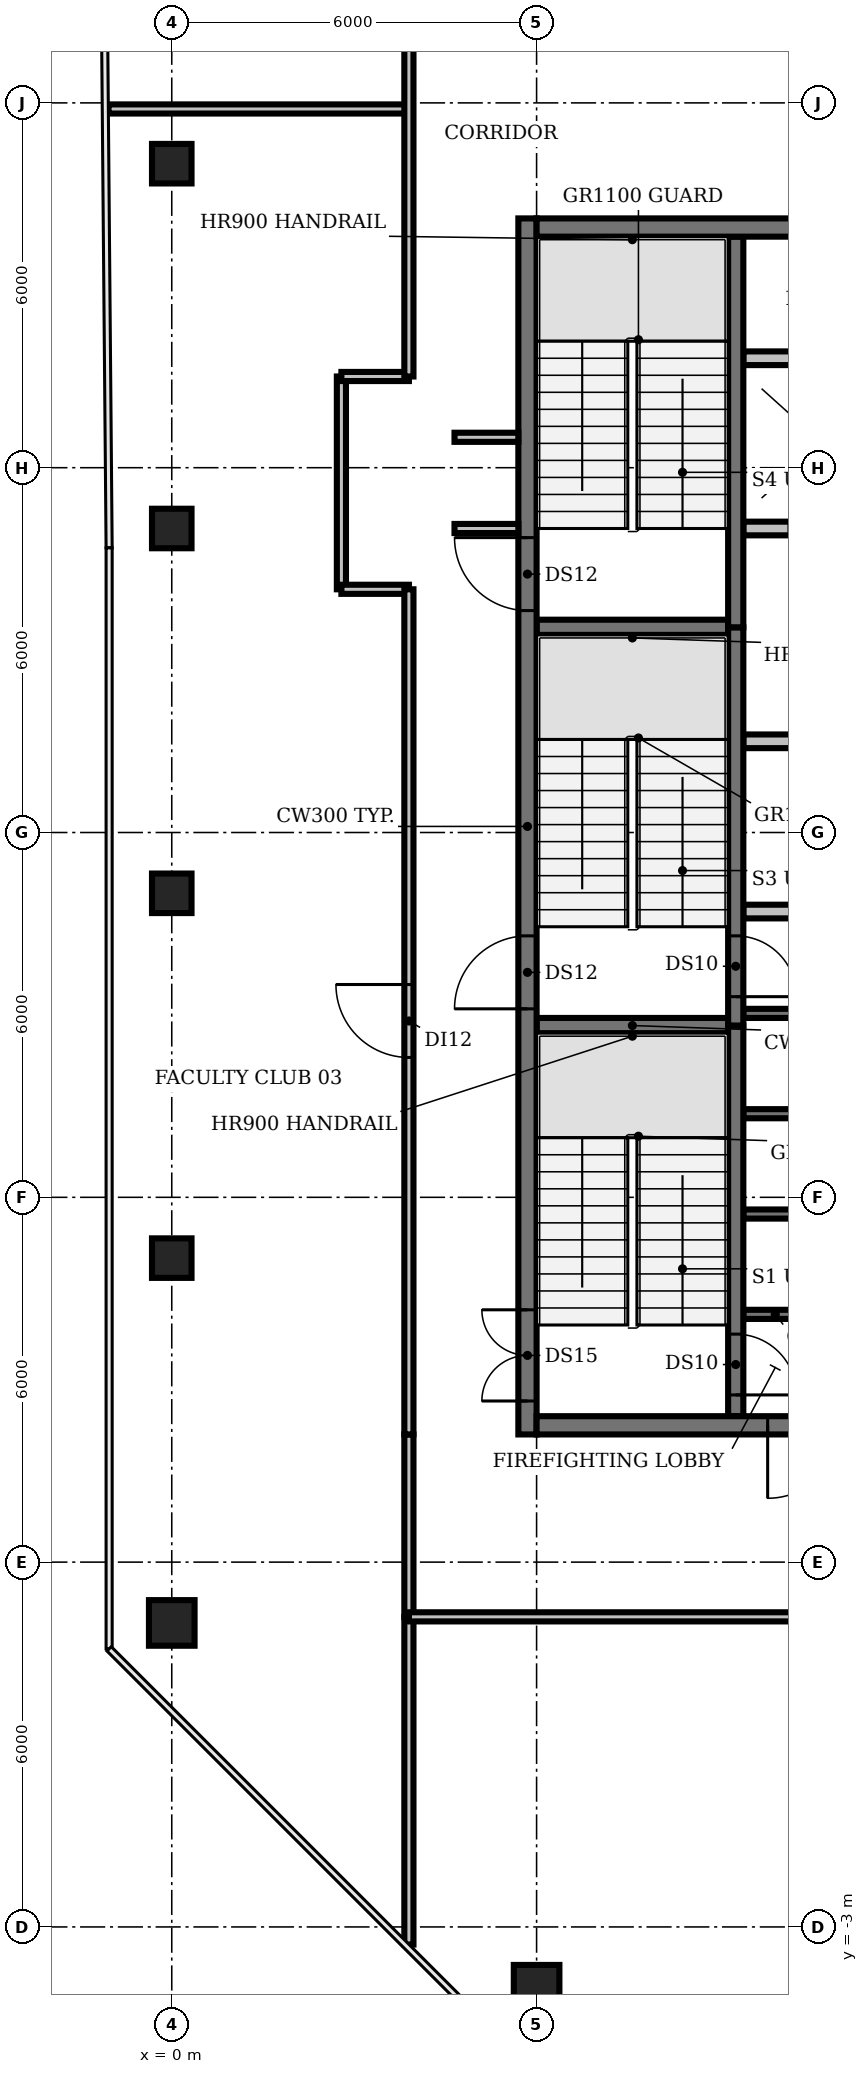
"""IFC4 building model, lengths in metres.
Left out: names, types, materials, properties, quantities, classifications, styles, units other than length and angle.
Written with IfcOpenShell. Run it as: python <this file> out.ifc"""

import sys

from ifc_helpers import new_model, si_unit, direction, frame, frame_2d, origin, origin_2d, place, context, subcontext, project, spatial, rectangle, circle, extrude, element, fill, save


model = new_model("IFC4")
c1 = context("Model", 3, precision=1e-05, world=origin(), true_north=direction((0.0, 1.0)))
c2 = subcontext(c1, "Body", "Model", "MODEL_VIEW")
j1 = project(units=[si_unit("LENGTHUNIT", "METRE"), si_unit("PLANEANGLEUNIT", "RADIAN")], contexts=[c1])
p1 = place(None, origin())
s1 = spatial("IfcSite", under=j1, at=p1, CompositionType="ELEMENT")
p2 = place(p1, origin())
s2 = spatial("IfcBuilding", under=s1, at=p2, CompositionType="ELEMENT")
p3 = place(p2, frame((0.0, 0.0, 331.4)))
s3 = spatial("IfcBuildingStorey", under=s2, at=p3, CompositionType="ELEMENT", Elevation=331.4)
p4 = place(p3, frame((0.0, 2.0, 0.0), z_axis=(0.0, 0.0, 1.0), x_axis=(1.0, 0.0, 0.0)))
e1 = element("IfcColumn", 1, at=p4, inside=s3, PredefinedType="COLUMN", context=c2, shape_type="SweptSolid", body=[
    extrude(circle(Radius=0.375, at=origin_2d()), origin(), (0.0, 0.0, 1.0), 3.9),
])
for number, where, z_axis, x_axis in (
    (2, (0.0, 8.0, 0.0), (0.0, 0.0, 1.0), (1.0, 0.0, 0.0)),
    (3, (0.0, 14.0, 0.0), (0.0, 0.0, 1.0), (1.0, 0.0, 0.0)),
    (4, (0.0, 20.0, 0.0), (0.0, 0.0, 1.0), (1.0, 0.0, 0.0)),
    (5, (0.0, 26.0, 0.0), (0.0, 0.0, 1.0), (1.0, 0.0, 0.0)),
):
    element("IfcColumn", number, at=place(p3, frame(where, z_axis=z_axis, x_axis=x_axis)), inside=s3, PredefinedType="COLUMN", context=c2, shape_type="SweptSolid", body=[
        extrude(rectangle(XDim=0.65, YDim=0.65, at=origin_2d()), origin(), (0.0, 0.0, 1.0), 3.9),
    ])
p5 = place(p3, frame((6.0, -4.0, 0.0), z_axis=(0.0, 0.0, 1.0), x_axis=(1.0, 0.0, 0.0)))
e6 = element("IfcColumn", 6, at=p5, inside=s3, PredefinedType="COLUMN", context=c2, shape_type="SweptSolid", body=[
    extrude(circle(Radius=0.375, at=origin_2d()), origin(), (0.0, 0.0, 1.0), 3.9),
])
for number, where, z_axis, x_axis in (
    (7, (9.4, 7.075, 0.0), (0.0, 0.0, 1.0), (1.0, 0.0, 0.0)),
    (8, (9.4, 8.725, 0.0), (0.0, 0.0, 1.0), (1.0, 0.0, 0.0)),
    (9, (9.4, 10.375, 0.0), (0.0, 0.0, 1.0), (1.0, 0.0, 0.0)),
):
    element("IfcWall", number, at=place(p3, frame(where, z_axis=z_axis, x_axis=x_axis)), inside=s3, PredefinedType="SHEAR", context=c2, shape_type="SweptSolid", body=[
        extrude(rectangle(XDim=1.05, YDim=0.15, at=frame_2d((0.525, 0.0))), origin(), (0.0, 0.0, 1.0), 3.9),
    ])
p6 = place(p3, frame((6.0, 11.825, 0.0), z_axis=(0.0, 0.0, 1.0), x_axis=(1.0, 0.0, 0.0)))
e10 = element("IfcWall", 10, at=p6, inside=s3, PredefinedType="SHEAR", context=c2, shape_type="SweptSolid", body=[
    extrude(rectangle(XDim=3.15, YDim=0.25, at=frame_2d((1.575, 0.0))), origin(), (0.0, 0.0, 1.0), 3.9),
])
p7 = place(p3, frame((9.4, 12.025, 0.0), z_axis=(0.0, 0.0, 1.0), x_axis=(1.0, 0.0, 0.0)))
e11 = element("IfcWall", 11, at=p7, inside=s3, PredefinedType="SHEAR", context=c2, shape_type="SweptSolid", body=[
    extrude(rectangle(XDim=1.05, YDim=0.15, at=frame_2d((0.525, 0.0))), origin(), (0.0, 0.0, 1.0), 3.9),
])
p8 = place(p3, frame((9.4, 13.7, 0.0), z_axis=(0.0, 0.0, 1.0), x_axis=(1.0, 0.0, 0.0)))
e12 = element("IfcWall", 12, at=p8, inside=s3, PredefinedType="PARTITIONING", context=c2, shape_type="SweptSolid", body=[
    extrude(rectangle(XDim=4.0, YDim=0.225, at=frame_2d((2.0, 0.0))), origin(), (0.0, 0.0, 1.0), 3.9),
])
p9 = place(p3, frame((9.4, 16.5, 0.0), z_axis=(0.0, 0.0, 1.0), x_axis=(1.0, 0.0, 0.0)))
e13 = element("IfcWall", 13, at=p9, inside=s3, PredefinedType="PARTITIONING", context=c2, shape_type="SweptSolid", body=[
    extrude(rectangle(XDim=14.6, YDim=0.225, at=frame_2d((7.3, 0.0))), origin(), (0.0, 0.0, 1.0), 3.9),
])
p10 = place(p9, frame((1.9, 0.0, 0.0)))
e14 = element("IfcOpeningElement", 14, at=p10, cuts=e13, PredefinedType="OPENING", context=c2, shape_type="SweptSolid", body=[
    extrude(rectangle(XDim=1.0, YDim=2.1, at=frame_2d((0.5, 1.05))), frame((0.0, 0.123, 0.0), z_axis=(0.0, -1.0, 0.0), x_axis=(1.0, 0.0, 0.0)), (0.0, 0.0, 1.0), 0.245),
])
p11 = place(p9, frame((7.475, 0.0, 0.0)))
e15 = element("IfcOpeningElement", 15, at=p11, cuts=e13, PredefinedType="OPENING", context=c2, shape_type="SweptSolid", body=[
    extrude(rectangle(XDim=1.0, YDim=2.1, at=frame_2d((0.5, 1.05))), frame((0.0, 0.123, 0.0), z_axis=(0.0, -1.0, 0.0), x_axis=(1.0, 0.0, 0.0)), (0.0, 0.0, 1.0), 0.245),
])
p12 = place(p9, frame((11.647, 0.0, 0.0)))
e16 = element("IfcOpeningElement", 16, at=p12, cuts=e13, PredefinedType="OPENING", context=c2, shape_type="SweptSolid", body=[
    extrude(rectangle(XDim=0.9, YDim=2.1, at=frame_2d((0.45, 1.05))), frame((0.0, 0.123, 0.0), z_axis=(0.0, -1.0, 0.0), x_axis=(1.0, 0.0, 0.0)), (0.0, 0.0, 1.0), 0.245),
])
p13 = place(p9, frame((13.423, 0.0, 0.0)))
e17 = element("IfcOpeningElement", 17, at=p13, cuts=e13, PredefinedType="OPENING", context=c2, shape_type="SweptSolid", body=[
    extrude(rectangle(XDim=0.9, YDim=2.1, at=frame_2d((0.45, 1.05))), frame((0.0, 0.123, 0.0), z_axis=(0.0, -1.0, 0.0), x_axis=(1.0, 0.0, 0.0)), (0.0, 0.0, 1.0), 0.245),
])
p14 = place(p3, frame((6.0, 18.375, 0.0), z_axis=(0.0, 0.0, 1.0), x_axis=(1.0, 0.0, 0.0)))
e18 = element("IfcWall", 18, at=p14, inside=s3, PredefinedType="SHEAR", context=c2, shape_type="SweptSolid", body=[
    extrude(rectangle(XDim=3.15, YDim=0.25, at=frame_2d((1.575, 0.0))), origin(), (0.0, 0.0, 1.0), 3.9),
])
p15 = place(p3, frame((24.0, 20.0, 0.0), z_axis=(0.0, 0.0, 1.0), x_axis=(-1.0, 0.0, 0.0)))
e19 = element("IfcWall", 19, at=p15, inside=s3, PredefinedType="PARTITIONING", context=c2, shape_type="SweptSolid", body=[
    extrude(rectangle(XDim=14.6, YDim=0.225, at=frame_2d((7.3, 0.0))), origin(), (0.0, 0.0, 1.0), 3.9),
])
p16 = place(p15, frame((12.75, 0.0, 0.0)))
e20 = element("IfcOpeningElement", 20, at=p16, cuts=e19, PredefinedType="OPENING", context=c2, shape_type="SweptSolid", body=[
    extrude(rectangle(XDim=1.1, YDim=2.1, at=frame_2d((0.55, 1.05))), frame((0.0, 0.123, 0.0), z_axis=(0.0, -1.0, 0.0), x_axis=(1.0, 0.0, 0.0)), (0.0, 0.0, 1.0), 0.245),
])
p17 = place(p15, frame((9.95, 0.0, 0.0)))
e21 = element("IfcOpeningElement", 21, at=p17, cuts=e19, PredefinedType="OPENING", context=c2, shape_type="SweptSolid", body=[
    extrude(rectangle(XDim=1.1, YDim=2.1, at=frame_2d((0.55, 1.05))), frame((0.0, 0.123, 0.0), z_axis=(0.0, -1.0, 0.0), x_axis=(1.0, 0.0, 0.0)), (0.0, 0.0, 1.0), 0.245),
])
p18 = place(p15, frame((7.15, 0.0, 0.0)))
e22 = element("IfcOpeningElement", 22, at=p18, cuts=e19, PredefinedType="OPENING", context=c2, shape_type="SweptSolid", body=[
    extrude(rectangle(XDim=1.1, YDim=2.1, at=frame_2d((0.55, 1.05))), frame((0.0, 0.123, 0.0), z_axis=(0.0, -1.0, 0.0), x_axis=(1.0, 0.0, 0.0)), (0.0, 0.0, 1.0), 0.245),
])
p19 = place(p15, frame((4.35, 0.0, 0.0)))
e23 = element("IfcOpeningElement", 23, at=p19, cuts=e19, PredefinedType="OPENING", context=c2, shape_type="SweptSolid", body=[
    extrude(rectangle(XDim=1.1, YDim=2.1, at=frame_2d((0.55, 1.05))), frame((0.0, 0.123, 0.0), z_axis=(0.0, -1.0, 0.0), x_axis=(1.0, 0.0, 0.0)), (0.0, 0.0, 1.0), 0.245),
])
p20 = place(p15, frame((2.137, 0.0, 0.0)))
e24 = element("IfcOpeningElement", 24, at=p20, cuts=e19, PredefinedType="OPENING", context=c2, shape_type="SweptSolid", body=[
    extrude(rectangle(XDim=0.9, YDim=2.1, at=frame_2d((0.45, 1.05))), frame((0.0, 0.123, 0.0), z_axis=(0.0, -1.0, 0.0), x_axis=(1.0, 0.0, 0.0)), (0.0, 0.0, 1.0), 0.245),
])
p21 = place(p15, frame((0.562, 0.0, 0.0)))
e25 = element("IfcOpeningElement", 25, at=p21, cuts=e19, PredefinedType="OPENING", context=c2, shape_type="SweptSolid", body=[
    extrude(rectangle(XDim=0.9, YDim=2.1, at=frame_2d((0.45, 1.05))), frame((0.0, 0.123, 0.0), z_axis=(0.0, -1.0, 0.0), x_axis=(1.0, 0.0, 0.0)), (0.0, 0.0, 1.0), 0.245),
])
p22 = place(p3, frame((9.4, 22.8, 0.0), z_axis=(0.0, 0.0, 1.0), x_axis=(1.0, 0.0, 0.0)))
e26 = element("IfcWall", 26, at=p22, inside=s3, PredefinedType="PARTITIONING", context=c2, shape_type="SweptSolid", body=[
    extrude(rectangle(XDim=14.6, YDim=0.225, at=frame_2d((7.3, 0.0))), origin(), (0.0, 0.0, 1.0), 3.9),
])
p23 = place(p3, frame((9.275, 11.825, 0.0), z_axis=(0.0, 0.0, 1.0), x_axis=(0.0, -1.0, 0.0)))
e27 = element("IfcWall", 27, at=p23, inside=s3, PredefinedType="SHEAR", context=c2, shape_type="SweptSolid", body=[
    extrude(rectangle(XDim=6.425, YDim=0.25, at=frame_2d((3.212, 0.0))), origin(), (0.0, 0.0, 1.0), 3.9),
])
p24 = place(p23, frame((5.075, 0.0, 0.0)))
e28 = element("IfcOpeningElement", 28, at=p24, cuts=e27, PredefinedType="OPENING", context=c2, shape_type="SweptSolid", body=[
    extrude(rectangle(XDim=1.0, YDim=2.1, at=frame_2d((0.5, 1.05))), frame((0.0, 0.135, 0.0), z_axis=(0.0, -1.0, 0.0), x_axis=(1.0, 0.0, 0.0)), (0.0, 0.0, 1.0), 0.27),
])
p25 = place(p3, frame((9.275, 18.375, 0.0), z_axis=(0.0, 0.0, 1.0), x_axis=(0.0, -1.0, 0.0)))
e29 = element("IfcWall", 29, at=p25, inside=s3, PredefinedType="SHEAR", context=c2, shape_type="SweptSolid", body=[
    extrude(rectangle(XDim=6.55, YDim=0.25, at=frame_2d((3.275, 0.0))), origin(), (0.0, 0.0, 1.0), 3.9),
])
p26 = place(p25, frame((5.075, 0.0, 0.0)))
e30 = element("IfcOpeningElement", 30, at=p26, cuts=e29, PredefinedType="OPENING", context=c2, shape_type="SweptSolid", body=[
    extrude(rectangle(XDim=1.0, YDim=2.1, at=frame_2d((0.5, 1.05))), frame((0.0, 0.135, 0.0), z_axis=(0.0, -1.0, 0.0), x_axis=(1.0, 0.0, 0.0)), (0.0, 0.0, 1.0), 0.27),
])
p27 = place(p3, frame((9.275, 18.375, 0.0), z_axis=(0.0, 0.0, 1.0), x_axis=(0.0, 1.0, 0.0)))
e31 = element("IfcWall", 31, at=p27, inside=s3, PredefinedType="SHEAR", context=c2, shape_type="SweptSolid", body=[
    extrude(rectangle(XDim=6.425, YDim=0.25, at=frame_2d((3.212, 0.0))), origin(), (0.0, 0.0, 1.0), 3.9),
])
p28 = place(p3, frame((5.85, 5.1, 0.0), z_axis=(0.0, 0.0, 1.0), x_axis=(0.0, 1.0, 0.0)))
e32 = element("IfcWall", 32, at=p28, inside=s3, PredefinedType="SHEAR", context=c2, shape_type="SweptSolid", body=[
    extrude(rectangle(XDim=20.0, YDim=0.3, at=frame_2d((10.0, 0.0))), origin(), (0.0, 0.0, 1.0), 3.9),
])
p29 = place(p28, frame((0.55, 0.0, 0.0)))
e33 = element("IfcOpeningElement", 33, at=p29, cuts=e32, PredefinedType="OPENING", context=c2, shape_type="SweptSolid", body=[
    extrude(rectangle(XDim=1.5, YDim=2.1, at=frame_2d((0.75, 1.05))), frame((0.0, 0.16, 0.0), z_axis=(0.0, -1.0, 0.0), x_axis=(1.0, 0.0, 0.0)), (0.0, 0.0, 1.0), 0.32),
])
p30 = place(p28, frame((7.0, 0.0, 0.0)))
e34 = element("IfcOpeningElement", 34, at=p30, cuts=e32, PredefinedType="OPENING", context=c2, shape_type="SweptSolid", body=[
    extrude(rectangle(XDim=1.2, YDim=2.1, at=frame_2d((0.6, 1.05))), frame((0.0, 0.16, 0.0), z_axis=(0.0, -1.0, 0.0), x_axis=(1.0, 0.0, 0.0)), (0.0, 0.0, 1.0), 0.32),
])
p31 = place(p28, frame((13.55, 0.0, 0.0)))
e35 = element("IfcOpeningElement", 35, at=p31, cuts=e32, PredefinedType="OPENING", context=c2, shape_type="SweptSolid", body=[
    extrude(rectangle(XDim=1.2, YDim=2.1, at=frame_2d((0.6, 1.05))), frame((0.0, 0.16, 0.0), z_axis=(0.0, -1.0, 0.0), x_axis=(1.0, 0.0, 0.0)), (0.0, 0.0, 1.0), 0.32),
])
p32 = place(p3, frame((24.0, 5.25, 0.0), z_axis=(0.0, 0.0, 1.0), x_axis=(-1.0, 0.0, 0.0)))
e36 = element("IfcWall", 36, at=p32, inside=s3, PredefinedType="SHEAR", context=c2, shape_type="SweptSolid", body=[
    extrude(rectangle(XDim=18.0, YDim=0.3, at=frame_2d((9.0, 0.0))), origin(), (0.0, 0.0, 1.0), 3.9),
])
p33 = place(p32, frame((13.0, 0.0, 0.0)))
e37 = element("IfcOpeningElement", 37, at=p33, cuts=e36, PredefinedType="OPENING", context=c2, shape_type="SweptSolid", body=[
    extrude(rectangle(XDim=1.2, YDim=2.1, at=frame_2d((0.6, 1.05))), frame((0.0, 0.16, 0.0), z_axis=(0.0, -1.0, 0.0), x_axis=(1.0, 0.0, 0.0)), (0.0, 0.0, 1.0), 0.32),
])
p34 = place(p32, frame((4.9, 0.0, 0.0)))
e38 = element("IfcOpeningElement", 38, at=p34, cuts=e36, PredefinedType="OPENING", context=c2, shape_type="SweptSolid", body=[
    extrude(rectangle(XDim=1.0, YDim=2.1, at=frame_2d((0.5, 1.05))), frame((0.0, 0.16, 0.0), z_axis=(0.0, -1.0, 0.0), x_axis=(1.0, 0.0, 0.0)), (0.0, 0.0, 1.0), 0.32),
])
p35 = place(p3, frame((6.0, 24.95, 0.0), z_axis=(0.0, 0.0, 1.0), x_axis=(1.0, 0.0, 0.0)))
e39 = element("IfcWall", 39, at=p35, inside=s3, PredefinedType="SHEAR", context=c2, shape_type="SweptSolid", body=[
    extrude(rectangle(XDim=18.0, YDim=0.3, at=frame_2d((9.0, 0.0))), origin(), (0.0, 0.0, 1.0), 3.9),
])
p36 = place(p3, frame((-1.04, 26.9, 0.0), z_axis=(0.0, 0.0, 1.0), x_axis=(1.0, 0.0, 0.0)))
e40 = element("IfcWall", 40, at=p36, inside=s3, PredefinedType="PARTITIONING", context=c2, shape_type="SweptSolid", body=[
    extrude(rectangle(XDim=4.94, YDim=0.15, at=frame_2d((2.47, 0.0))), origin(), (0.0, 0.0, 1.0), 2.48),
])
p37 = place(p3, frame((2.79, 19.0, 0.0), z_axis=(0.0, 0.0, 1.0), x_axis=(0.0, 1.0, 0.0)))
e41 = element("IfcWall", 41, at=p37, inside=s3, PredefinedType="PARTITIONING", context=c2, shape_type="SweptSolid", body=[
    extrude(rectangle(XDim=3.5, YDim=0.15, at=frame_2d((1.75, 0.0))), origin(), (0.0, 0.0, 1.0), 2.48),
])
for number, where, z_axis, x_axis in (
    (42, (2.79, 19.0, 0.0), (0.0, 0.0, 1.0), (1.0, 0.0, 0.0)),
    (43, (2.79, 22.5, 0.0), (0.0, 0.0, 1.0), (1.0, 0.0, 0.0)),
):
    element("IfcWall", number, at=place(p3, frame(where, z_axis=z_axis, x_axis=x_axis)), inside=s3, PredefinedType="PARTITIONING", context=c2, shape_type="SweptSolid", body=[
        extrude(rectangle(XDim=1.11, YDim=0.15, at=frame_2d((0.555, 0.0))), origin(), (0.0, 0.0, 1.0), 2.48),
    ])
p38 = place(p3, frame((3.9, -3.29, 0.0), z_axis=(0.0, 0.0, 1.0), x_axis=(0.0, 1.0, 0.0)))
e44 = element("IfcWall", 44, at=p38, inside=s3, PredefinedType="PARTITIONING", context=c2, shape_type="SweptSolid", body=[
    extrude(rectangle(XDim=5.39, YDim=0.15, at=frame_2d((2.695, 0.0))), origin(), (0.0, 0.0, 1.0), 2.48),
])
p39 = place(p3, frame((3.9, 2.1, 0.0), z_axis=(0.0, 0.0, 1.0), x_axis=(0.0, 1.0, 0.0)))
e45 = element("IfcWall", 45, at=p39, inside=s3, PredefinedType="PARTITIONING", context=c2, shape_type="SweptSolid", body=[
    extrude(rectangle(XDim=3.0, YDim=0.15, at=frame_2d((1.5, 0.0))), origin(), (0.0, 0.0, 1.0), 2.48),
])
p40 = place(p3, frame((3.9, 5.1, 0.0), z_axis=(0.0, 0.0, 1.0), x_axis=(0.0, 1.0, 0.0)))
e46 = element("IfcWall", 46, at=p40, inside=s3, PredefinedType="PARTITIONING", context=c2, shape_type="SweptSolid", body=[
    extrude(rectangle(XDim=13.9, YDim=0.15, at=frame_2d((6.95, 0.0))), origin(), (0.0, 0.0, 1.0), 2.48),
])
p41 = place(p40, frame((6.2, 0.0, 0.0)))
e47 = element("IfcOpeningElement", 47, at=p41, cuts=e46, PredefinedType="OPENING", context=c2, shape_type="SweptSolid", body=[
    extrude(rectangle(XDim=1.2, YDim=2.1, at=frame_2d((0.6, 1.05))), frame((0.0, 0.085, 0.0), z_axis=(0.0, -1.0, 0.0), x_axis=(1.0, 0.0, 0.0)), (0.0, 0.0, 1.0), 0.17),
])
p42 = place(p3, frame((3.9, 22.5, 0.0), z_axis=(0.0, 0.0, 1.0), x_axis=(0.0, 1.0, 0.0)))
e48 = element("IfcWall", 48, at=p42, inside=s3, PredefinedType="PARTITIONING", context=c2, shape_type="SweptSolid", body=[
    extrude(rectangle(XDim=5.6, YDim=0.15, at=frame_2d((2.8, 0.0))), origin(), (0.0, 0.0, 1.0), 2.48),
])
for number, where, z_axis, x_axis in (
    (49, (4.65, 20.0, 0.0), (0.0, 0.0, 1.0), (1.0, 0.0, 0.0)),
    (50, (4.65, 21.5, 0.0), (0.0, 0.0, 1.0), (1.0, 0.0, 0.0)),
):
    element("IfcWall", number, at=place(p3, frame(where, z_axis=z_axis, x_axis=x_axis)), inside=s3, PredefinedType="PARTITIONING", context=c2, shape_type="SweptSolid", body=[
        extrude(rectangle(XDim=1.05, YDim=0.15, at=frame_2d((0.525, 0.0))), origin(), (0.0, 0.0, 1.0), 2.48),
    ])
p43 = place(p3, frame((26.1, 2.1, 0.0), z_axis=(0.0, 0.0, 1.0), x_axis=(-1.0, 0.0, 0.0)))
e51 = element("IfcWall", 51, at=p43, inside=s3, PredefinedType="PARTITIONING", context=c2, shape_type="SweptSolid", body=[
    extrude(rectangle(XDim=22.2, YDim=0.15, at=frame_2d((11.1, 0.0))), origin(), (0.0, 0.0, 1.0), 2.48),
])
p44 = place(p43, frame((10.6, 0.0, 0.0)))
e52 = element("IfcOpeningElement", 52, at=p44, cuts=e51, PredefinedType="OPENING", context=c2, shape_type="SweptSolid", body=[
    extrude(rectangle(XDim=1.2, YDim=2.1, at=frame_2d((0.6, 1.05))), frame((0.0, 0.085, 0.0), z_axis=(0.0, -1.0, 0.0), x_axis=(1.0, 0.0, 0.0)), (0.0, 0.0, 1.0), 0.17),
])
p45 = place(p24, origin())
e53 = element("IfcDoor", 53, at=p45, inside=s3, OperationType="SINGLE_SWING_RIGHT", PredefinedType="DOOR", context=c2, shape_type="SweptSolid", body=[
    extrude(rectangle(XDim=1.0, YDim=2.1, at=frame_2d((0.5, 1.05))), frame((0.0, 0.025, 0.0), z_axis=(0.0, -1.0, 0.0), x_axis=(1.0, 0.0, 0.0)), (0.0, 0.0, 1.0), 0.05),
])
fill(e28, e53)
p46 = place(p26, origin())
e54 = element("IfcDoor", 54, at=p46, inside=s3, OperationType="SINGLE_SWING_RIGHT", PredefinedType="DOOR", context=c2, shape_type="SweptSolid", body=[
    extrude(rectangle(XDim=1.0, YDim=2.1, at=frame_2d((0.5, 1.05))), frame((0.0, 0.025, 0.0), z_axis=(0.0, -1.0, 0.0), x_axis=(1.0, 0.0, 0.0)), (0.0, 0.0, 1.0), 0.05),
])
fill(e30, e54)
p47 = place(p29, origin())
e55 = element("IfcDoor", 55, at=p47, inside=s3, OperationType="DOUBLE_DOOR_SINGLE_SWING", PredefinedType="DOOR", context=c2, shape_type="SweptSolid", body=[
    extrude(rectangle(XDim=1.5, YDim=2.1, at=frame_2d((0.75, 1.05))), frame((0.0, 0.025, 0.0), z_axis=(0.0, -1.0, 0.0), x_axis=(1.0, 0.0, 0.0)), (0.0, 0.0, 1.0), 0.05),
])
fill(e33, e55)
p48 = place(p30, origin())
e56 = element("IfcDoor", 56, at=p48, inside=s3, OperationType="SINGLE_SWING_LEFT", PredefinedType="DOOR", context=c2, shape_type="SweptSolid", body=[
    extrude(rectangle(XDim=1.2, YDim=2.1, at=frame_2d((0.6, 1.05))), frame((0.0, 0.025, 0.0), z_axis=(0.0, -1.0, 0.0), x_axis=(1.0, 0.0, 0.0)), (0.0, 0.0, 1.0), 0.05),
])
fill(e34, e56)
p49 = place(p31, origin())
e57 = element("IfcDoor", 57, at=p49, inside=s3, OperationType="SINGLE_SWING_RIGHT", PredefinedType="DOOR", context=c2, shape_type="SweptSolid", body=[
    extrude(rectangle(XDim=1.2, YDim=2.1, at=frame_2d((0.6, 1.05))), frame((0.0, 0.025, 0.0), z_axis=(0.0, -1.0, 0.0), x_axis=(1.0, 0.0, 0.0)), (0.0, 0.0, 1.0), 0.05),
])
fill(e35, e57)
p50 = place(p33, origin())
e58 = element("IfcDoor", 58, at=p50, inside=s3, OperationType="SINGLE_SWING_RIGHT", PredefinedType="DOOR", context=c2, shape_type="SweptSolid", body=[
    extrude(rectangle(XDim=1.2, YDim=2.1, at=frame_2d((0.6, 1.05))), frame((0.0, 0.025, 0.0), z_axis=(0.0, -1.0, 0.0), x_axis=(1.0, 0.0, 0.0)), (0.0, 0.0, 1.0), 0.05),
])
fill(e37, e58)
p51 = place(p41, origin())
e59 = element("IfcDoor", 59, at=p51, inside=s3, OperationType="SINGLE_SWING_RIGHT", PredefinedType="DOOR", context=c2, shape_type="SweptSolid", body=[
    extrude(rectangle(XDim=1.2, YDim=2.1, at=frame_2d((0.6, 1.05))), frame((0.0, 0.025, 0.0), z_axis=(0.0, -1.0, 0.0), x_axis=(1.0, 0.0, 0.0)), (0.0, 0.0, 1.0), 0.05),
])
fill(e47, e59)
save(model, sys.argv[1])
